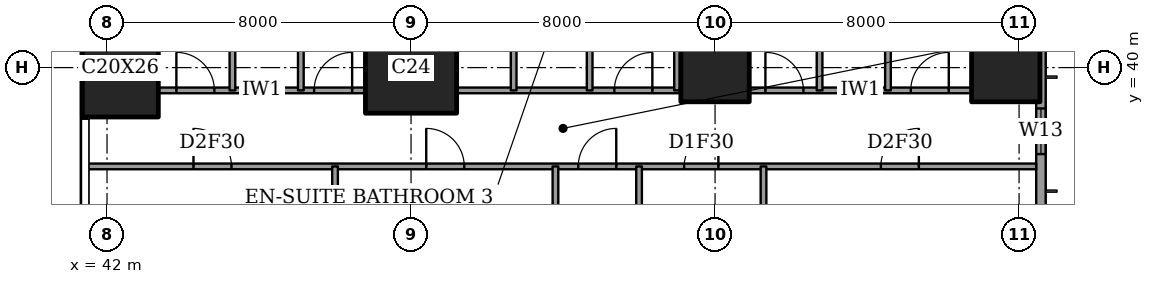
"""IFC4 building model, lengths in metres.
Left out: names, types, materials, properties, quantities, classifications, styles, units other than length and angle.
Written with IfcOpenShell. Run it as: python <this file> out.ifc"""

import sys

from ifc_helpers import new_model, si_unit, direction, frame, frame_2d, origin, origin_2d, place, context, subcontext, project, spatial, rectangle, extrude, element, fill, save


model = new_model("IFC4")
c1 = context("Model", 3, precision=1e-05, world=origin(), true_north=direction((0.0, 1.0)))
c2 = subcontext(c1, "Body", "Model", "MODEL_VIEW")
j1 = project(units=[si_unit("LENGTHUNIT", "METRE"), si_unit("PLANEANGLEUNIT", "RADIAN")], contexts=[c1])
p1 = place(None, origin())
s1 = spatial("IfcSite", under=j1, at=p1, CompositionType="ELEMENT")
p2 = place(p1, origin())
s2 = spatial("IfcBuilding", under=s1, at=p2, CompositionType="ELEMENT")
p3 = place(p2, frame((0.0, 0.0, 196.6)))
s3 = spatial("IfcBuildingStorey", under=s2, at=p3, CompositionType="ELEMENT", Elevation=196.6)
p4 = place(p3, frame((42.35, 40.0, 0.0), z_axis=(0.0, 0.0, 1.0), x_axis=(1.0, 0.0, 0.0)))
e1 = element("IfcColumn", 1, at=p4, inside=s3, PredefinedType="COLUMN", context=c2, shape_type="SweptSolid", body=[
    extrude(rectangle(XDim=2.0, YDim=2.6, at=origin_2d()), origin(), (0.0, 0.0, 1.0), 3.6),
])
p5 = place(p3, frame((50.0, 40.0, 0.0), z_axis=(0.0, 0.0, 1.0), x_axis=(1.0, 0.0, 0.0)))
e2 = element("IfcColumn", 2, at=p5, inside=s3, PredefinedType="COLUMN", context=c2, shape_type="SweptSolid", body=[
    extrude(rectangle(XDim=2.4, YDim=2.4, at=origin_2d()), origin(), (0.0, 0.0, 1.0), 3.6),
])
for number, where, z_axis, x_axis in (
    (3, (58.0, 40.0, 0.0), (0.0, 0.0, 1.0), (1.0, 0.0, 0.0)),
    (4, (65.65, 40.0, 0.0), (0.0, 0.0, 1.0), (1.0, 0.0, 0.0)),
):
    element("IfcColumn", number, at=place(p3, frame(where, z_axis=z_axis, x_axis=x_axis)), inside=s3, PredefinedType="COLUMN", context=c2, shape_type="SweptSolid", body=[
        extrude(rectangle(XDim=1.8, YDim=1.8, at=origin_2d()), origin(), (0.0, 0.0, 1.0), 3.6),
    ])
p6 = place(p3, frame((66.575, 3.175, 0.0), z_axis=(0.0, 0.0, 1.0), x_axis=(0.0, 1.0, 0.0)))
e5 = element("IfcWall", 5, at=p6, inside=s3, PredefinedType="SOLIDWALL", context=c2, shape_type="SweptSolid", body=[
    extrude(rectangle(XDim=41.65, YDim=0.25, at=frame_2d((20.825, 0.0))), origin(), (0.0, 0.0, 1.0), 3.6),
])
p7 = place(p6, frame((0.825, 0.0, 0.2)))
e6 = element("IfcOpeningElement", 6, at=p7, cuts=e5, PredefinedType="OPENING", context=c2, shape_type="SweptSolid", body=[
    extrude(rectangle(XDim=2.4, YDim=2.4, at=frame_2d((1.2, 1.2))), frame((0.0, 0.135, 0.0), z_axis=(0.0, -1.0, 0.0), x_axis=(1.0, 0.0, 0.0)), (0.0, 0.0, 1.0), 0.27),
])
p8 = place(p6, frame((6.05, 0.0, 0.2)))
e7 = element("IfcOpeningElement", 7, at=p8, cuts=e5, PredefinedType="OPENING", context=c2, shape_type="SweptSolid", body=[
    extrude(rectangle(XDim=1.2, YDim=2.4, at=frame_2d((0.6, 1.2))), frame((0.0, 0.135, 0.0), z_axis=(0.0, -1.0, 0.0), x_axis=(1.0, 0.0, 0.0)), (0.0, 0.0, 1.0), 0.27),
])
p9 = place(p6, frame((8.475, 0.0, 0.2)))
e8 = element("IfcOpeningElement", 8, at=p9, cuts=e5, PredefinedType="OPENING", context=c2, shape_type="SweptSolid", body=[
    extrude(rectangle(XDim=2.4, YDim=2.4, at=frame_2d((1.2, 1.2))), frame((0.0, 0.135, 0.0), z_axis=(0.0, -1.0, 0.0), x_axis=(1.0, 0.0, 0.0)), (0.0, 0.0, 1.0), 0.27),
])
p10 = place(p6, frame((15.675, 0.0, 0.2)))
e9 = element("IfcOpeningElement", 9, at=p10, cuts=e5, PredefinedType="OPENING", context=c2, shape_type="SweptSolid", body=[
    extrude(rectangle(XDim=2.4, YDim=2.4, at=frame_2d((1.2, 1.2))), frame((0.0, 0.135, 0.0), z_axis=(0.0, -1.0, 0.0), x_axis=(1.0, 0.0, 0.0)), (0.0, 0.0, 1.0), 0.27),
])
p11 = place(p6, frame((23.625, 0.0, 0.2)))
e10 = element("IfcOpeningElement", 10, at=p11, cuts=e5, PredefinedType="OPENING", context=c2, shape_type="SweptSolid", body=[
    extrude(rectangle(XDim=2.4, YDim=2.4, at=frame_2d((1.2, 1.2))), frame((0.0, 0.135, 0.0), z_axis=(0.0, -1.0, 0.0), x_axis=(1.0, 0.0, 0.0)), (0.0, 0.0, 1.0), 0.27),
])
p12 = place(p6, frame((30.775, 0.0, 0.2)))
e11 = element("IfcOpeningElement", 11, at=p12, cuts=e5, PredefinedType="OPENING", context=c2, shape_type="SweptSolid", body=[
    extrude(rectangle(XDim=2.4, YDim=2.4, at=frame_2d((1.2, 1.2))), frame((0.0, 0.135, 0.0), z_axis=(0.0, -1.0, 0.0), x_axis=(1.0, 0.0, 0.0)), (0.0, 0.0, 1.0), 0.27),
])
p13 = place(p6, frame((34.55, 0.0, 0.2)))
e12 = element("IfcOpeningElement", 12, at=p13, cuts=e5, PredefinedType="OPENING", context=c2, shape_type="SweptSolid", body=[
    extrude(rectangle(XDim=1.2, YDim=2.4, at=frame_2d((0.6, 1.2))), frame((0.0, 0.135, 0.0), z_axis=(0.0, -1.0, 0.0), x_axis=(1.0, 0.0, 0.0)), (0.0, 0.0, 1.0), 0.27),
])
p14 = place(p6, frame((38.425, 0.0, 0.2)))
e13 = element("IfcOpeningElement", 13, at=p14, cuts=e5, PredefinedType="OPENING", context=c2, shape_type="SweptSolid", body=[
    extrude(rectangle(XDim=2.4, YDim=2.4, at=frame_2d((1.2, 1.2))), frame((0.0, 0.135, 0.0), z_axis=(0.0, -1.0, 0.0), x_axis=(1.0, 0.0, 0.0)), (0.0, 0.0, 1.0), 0.27),
])
p15 = place(p3, frame((41.439, 37.4, 0.0), z_axis=(0.0, 0.0, 1.0), x_axis=(1.0, 0.0, 0.0)))
e14 = element("IfcWall", 14, at=p15, inside=s3, PredefinedType="PARTITIONING", context=c2, shape_type="SweptSolid", body=[
    extrude(rectangle(XDim=25.011, YDim=0.15, at=frame_2d((12.505, 0.0))), origin(), (0.0, 0.0, 1.0), 3.35),
])
p16 = place(p15, frame((12.961, 0.0, 0.0)))
e15 = element("IfcOpeningElement", 15, at=p16, cuts=e14, PredefinedType="OPENING", context=c2, shape_type="SweptSolid", body=[
    extrude(rectangle(XDim=1.0, YDim=2.1, at=frame_2d((0.5, 1.05))), frame((0.0, 0.085, 0.0), z_axis=(0.0, -1.0, 0.0), x_axis=(1.0, 0.0, 0.0)), (0.0, 0.0, 1.0), 0.17),
])
p17 = place(p15, frame((20.924, 0.0, 0.0)))
e16 = element("IfcOpeningElement", 16, at=p17, cuts=e14, PredefinedType="OPENING", context=c2, shape_type="SweptSolid", body=[
    extrude(rectangle(XDim=1.0, YDim=2.1, at=frame_2d((0.5, 1.05))), frame((0.0, 0.085, 0.0), z_axis=(0.0, -1.0, 0.0), x_axis=(1.0, 0.0, 0.0)), (0.0, 0.0, 1.0), 0.17),
])
p18 = place(p15, frame((15.749, 0.0, 0.0)))
e17 = element("IfcOpeningElement", 17, at=p18, cuts=e14, PredefinedType="OPENING", context=c2, shape_type="SweptSolid", body=[
    extrude(rectangle(XDim=0.9, YDim=2.1, at=frame_2d((0.45, 1.05))), frame((0.0, 0.085, 0.0), z_axis=(0.0, -1.0, 0.0), x_axis=(1.0, 0.0, 0.0)), (0.0, 0.0, 1.0), 0.17),
])
p19 = place(p15, frame((8.961, 0.0, 0.0)))
e18 = element("IfcOpeningElement", 18, at=p19, cuts=e14, PredefinedType="OPENING", context=c2, shape_type="SweptSolid", body=[
    extrude(rectangle(XDim=1.0, YDim=2.1, at=frame_2d((0.5, 1.05))), frame((0.0, 0.085, 0.0), z_axis=(0.0, -1.0, 0.0), x_axis=(1.0, 0.0, 0.0)), (0.0, 0.0, 1.0), 0.17),
])
p20 = place(p15, frame((2.836, 0.0, 0.0)))
e19 = element("IfcOpeningElement", 19, at=p20, cuts=e14, PredefinedType="OPENING", context=c2, shape_type="SweptSolid", body=[
    extrude(rectangle(XDim=1.0, YDim=2.1, at=frame_2d((0.5, 1.05))), frame((0.0, 0.085, 0.0), z_axis=(0.0, -1.0, 0.0), x_axis=(1.0, 0.0, 0.0)), (0.0, 0.0, 1.0), 0.17),
])
p21 = place(p3, frame((43.35, 39.4, 0.0), z_axis=(0.0, 0.0, 1.0), x_axis=(1.0, 0.0, 0.0)))
e20 = element("IfcWall", 20, at=p21, inside=s3, PredefinedType="PARTITIONING", context=c2, shape_type="SweptSolid", body=[
    extrude(rectangle(XDim=5.45, YDim=0.15, at=frame_2d((2.725, 0.0))), origin(), (0.0, 0.0, 1.0), 3.35),
])
p22 = place(p21, frame((4.1, 0.0, 0.0)))
e21 = element("IfcOpeningElement", 21, at=p22, cuts=e20, PredefinedType="OPENING", context=c2, shape_type="SweptSolid", body=[
    extrude(rectangle(XDim=1.0, YDim=2.1, at=frame_2d((0.5, 1.05))), frame((0.0, 0.085, 0.0), z_axis=(0.0, -1.0, 0.0), x_axis=(1.0, 0.0, 0.0)), (0.0, 0.0, 1.0), 0.17),
])
p23 = place(p21, frame((0.475, 0.0, 0.0)))
e22 = element("IfcOpeningElement", 22, at=p23, cuts=e20, PredefinedType="OPENING", context=c2, shape_type="SweptSolid", body=[
    extrude(rectangle(XDim=1.0, YDim=2.1, at=frame_2d((0.5, 1.05))), frame((0.0, 0.085, 0.0), z_axis=(0.0, -1.0, 0.0), x_axis=(1.0, 0.0, 0.0)), (0.0, 0.0, 1.0), 0.17),
])
p24 = place(p3, frame((51.2, 39.4, 0.0), z_axis=(0.0, 0.0, 1.0), x_axis=(1.0, 0.0, 0.0)))
e23 = element("IfcWall", 23, at=p24, inside=s3, PredefinedType="PARTITIONING", context=c2, shape_type="SweptSolid", body=[
    extrude(rectangle(XDim=5.9, YDim=0.15, at=frame_2d((2.95, 0.0))), origin(), (0.0, 0.0, 1.0), 3.35),
])
p25 = place(p24, frame((4.15, 0.0, 0.0)))
e24 = element("IfcOpeningElement", 24, at=p25, cuts=e23, PredefinedType="OPENING", context=c2, shape_type="SweptSolid", body=[
    extrude(rectangle(XDim=1.0, YDim=2.1, at=frame_2d((0.5, 1.05))), frame((0.0, 0.085, 0.0), z_axis=(0.0, -1.0, 0.0), x_axis=(1.0, 0.0, 0.0)), (0.0, 0.0, 1.0), 0.17),
])
p26 = place(p3, frame((58.9, 39.4, 0.0), z_axis=(0.0, 0.0, 1.0), x_axis=(1.0, 0.0, 0.0)))
e25 = element("IfcWall", 25, at=p26, inside=s3, PredefinedType="PARTITIONING", context=c2, shape_type="SweptSolid", body=[
    extrude(rectangle(XDim=5.85, YDim=0.15, at=frame_2d((2.925, 0.0))), origin(), (0.0, 0.0, 1.0), 3.35),
])
p27 = place(p26, frame((4.25, 0.0, 0.0)))
e26 = element("IfcOpeningElement", 26, at=p27, cuts=e25, PredefinedType="OPENING", context=c2, shape_type="SweptSolid", body=[
    extrude(rectangle(XDim=1.0, YDim=2.1, at=frame_2d((0.5, 1.05))), frame((0.0, 0.085, 0.0), z_axis=(0.0, -1.0, 0.0), x_axis=(1.0, 0.0, 0.0)), (0.0, 0.0, 1.0), 0.17),
])
p28 = place(p26, frame((0.425, 0.0, 0.0)))
e27 = element("IfcOpeningElement", 27, at=p28, cuts=e25, PredefinedType="OPENING", context=c2, shape_type="SweptSolid", body=[
    extrude(rectangle(XDim=1.0, YDim=2.1, at=frame_2d((0.5, 1.05))), frame((0.0, 0.085, 0.0), z_axis=(0.0, -1.0, 0.0), x_axis=(1.0, 0.0, 0.0)), (0.0, 0.0, 1.0), 0.17),
])
p29 = place(p3, frame((45.3, 39.4, 0.0), z_axis=(0.0, 0.0, 1.0), x_axis=(0.0, 1.0, 0.0)))
e28 = element("IfcWall", 28, at=p29, inside=s3, PredefinedType="PARTITIONING", context=c2, shape_type="SweptSolid", body=[
    extrude(rectangle(XDim=9.05, YDim=0.15, at=frame_2d((4.525, 0.0))), origin(), (0.0, 0.0, 1.0), 3.35),
])
p30 = place(p3, frame((47.1, 39.4, 0.0), z_axis=(0.0, 0.0, 1.0), x_axis=(0.0, 1.0, 0.0)))
e29 = element("IfcWall", 29, at=p30, inside=s3, PredefinedType="PARTITIONING", context=c2, shape_type="SweptSolid", body=[
    extrude(rectangle(XDim=3.5, YDim=0.15, at=frame_2d((1.75, 0.0))), origin(), (0.0, 0.0, 1.0), 3.35),
])
p31 = place(p30, frame((1.3, 0.0, 0.0)))
e30 = element("IfcOpeningElement", 30, at=p31, cuts=e29, PredefinedType="OPENING", context=c2, shape_type="SweptSolid", body=[
    extrude(rectangle(XDim=0.9, YDim=2.1, at=frame_2d((0.45, 1.05))), frame((0.0, 0.085, 0.0), z_axis=(0.0, -1.0, 0.0), x_axis=(1.0, 0.0, 0.0)), (0.0, 0.0, 1.0), 0.17),
])
p32 = place(p3, frame((48.0, 28.0, 0.0), z_axis=(0.0, 0.0, 1.0), x_axis=(0.0, 1.0, 0.0)))
e31 = element("IfcWall", 31, at=p32, inside=s3, PredefinedType="PARTITIONING", context=c2, shape_type="SweptSolid", body=[
    extrude(rectangle(XDim=9.4, YDim=0.15, at=frame_2d((4.7, 0.0))), origin(), (0.0, 0.0, 1.0), 3.35),
])
p33 = place(p32, frame((0.837, 0.0, 0.0)))
e32 = element("IfcOpeningElement", 32, at=p33, cuts=e31, PredefinedType="OPENING", context=c2, shape_type="SweptSolid", body=[
    extrude(rectangle(XDim=1.0, YDim=2.1, at=frame_2d((0.5, 1.05))), frame((0.0, 0.085, 0.0), z_axis=(0.0, -1.0, 0.0), x_axis=(1.0, 0.0, 0.0)), (0.0, 0.0, 1.0), 0.17),
])
p34 = place(p3, frame((52.7, 39.4, 0.0), z_axis=(0.0, 0.0, 1.0), x_axis=(0.0, 1.0, 0.0)))
e33 = element("IfcWall", 33, at=p34, inside=s3, PredefinedType="PARTITIONING", context=c2, shape_type="SweptSolid", body=[
    extrude(rectangle(XDim=9.05, YDim=0.15, at=frame_2d((4.525, 0.0))), origin(), (0.0, 0.0, 1.0), 3.35),
])
p35 = place(p34, frame((5.675, 0.0, 0.0)))
e34 = element("IfcOpeningElement", 34, at=p35, cuts=e33, PredefinedType="OPENING", context=c2, shape_type="SweptSolid", body=[
    extrude(rectangle(XDim=0.9, YDim=2.1, at=frame_2d((0.45, 1.05))), frame((0.0, 0.085, 0.0), z_axis=(0.0, -1.0, 0.0), x_axis=(1.0, 0.0, 0.0)), (0.0, 0.0, 1.0), 0.17),
])
p36 = place(p3, frame((53.8, 30.675, 0.0), z_axis=(0.0, 0.0, 1.0), x_axis=(0.0, 1.0, 0.0)))
e35 = element("IfcWall", 35, at=p36, inside=s3, PredefinedType="PARTITIONING", context=c2, shape_type="SweptSolid", body=[
    extrude(rectangle(XDim=6.725, YDim=0.15, at=frame_2d((3.362, 0.0))), origin(), (0.0, 0.0, 1.0), 3.35),
])
p37 = place(p3, frame((54.7, 39.4, 0.0), z_axis=(0.0, 0.0, 1.0), x_axis=(0.0, 1.0, 0.0)))
e36 = element("IfcWall", 36, at=p37, inside=s3, PredefinedType="PARTITIONING", context=c2, shape_type="SweptSolid", body=[
    extrude(rectangle(XDim=3.2, YDim=0.15, at=frame_2d((1.6, 0.0))), origin(), (0.0, 0.0, 1.0), 3.35),
])
p38 = place(p37, frame((1.15, 0.0, 0.0)))
e37 = element("IfcOpeningElement", 37, at=p38, cuts=e36, PredefinedType="OPENING", context=c2, shape_type="SweptSolid", body=[
    extrude(rectangle(XDim=0.9, YDim=2.1, at=frame_2d((0.45, 1.05))), frame((0.0, 0.085, 0.0), z_axis=(0.0, -1.0, 0.0), x_axis=(1.0, 0.0, 0.0)), (0.0, 0.0, 1.0), 0.17),
])
p39 = place(p3, frame((56.0, 28.0, 0.0), z_axis=(0.0, 0.0, 1.0), x_axis=(0.0, 1.0, 0.0)))
e38 = element("IfcWall", 38, at=p39, inside=s3, PredefinedType="PARTITIONING", context=c2, shape_type="SweptSolid", body=[
    extrude(rectangle(XDim=9.4, YDim=0.15, at=frame_2d((4.7, 0.0))), origin(), (0.0, 0.0, 1.0), 3.35),
])
p40 = place(p39, frame((0.837, 0.0, 0.0)))
e39 = element("IfcOpeningElement", 39, at=p40, cuts=e38, PredefinedType="OPENING", context=c2, shape_type="SweptSolid", body=[
    extrude(rectangle(XDim=1.0, YDim=2.1, at=frame_2d((0.5, 1.05))), frame((0.0, 0.085, 0.0), z_axis=(0.0, -1.0, 0.0), x_axis=(1.0, 0.0, 0.0)), (0.0, 0.0, 1.0), 0.17),
])
p41 = place(p3, frame((57.0, 39.4, 0.0), z_axis=(0.0, 0.0, 1.0), x_axis=(0.0, 1.0, 0.0)))
e40 = element("IfcWall", 40, at=p41, inside=s3, PredefinedType="PARTITIONING", context=c2, shape_type="SweptSolid", body=[
    extrude(rectangle(XDim=9.05, YDim=0.15, at=frame_2d((4.525, 0.0))), origin(), (0.0, 0.0, 1.0), 3.35),
])
p42 = place(p3, frame((59.275, 33.2, 0.0), z_axis=(0.0, 0.0, 1.0), x_axis=(0.0, 1.0, 0.0)))
e41 = element("IfcWall", 41, at=p42, inside=s3, PredefinedType="PARTITIONING", context=c2, shape_type="SweptSolid", body=[
    extrude(rectangle(XDim=4.2, YDim=0.15, at=frame_2d((2.1, 0.0))), origin(), (0.0, 0.0, 1.0), 3.35),
])
p43 = place(p3, frame((60.75, 39.4, 0.0), z_axis=(0.0, 0.0, 1.0), x_axis=(0.0, 1.0, 0.0)))
e42 = element("IfcWall", 42, at=p43, inside=s3, PredefinedType="PARTITIONING", context=c2, shape_type="SweptSolid", body=[
    extrude(rectangle(XDim=9.05, YDim=0.15, at=frame_2d((4.525, 0.0))), origin(), (0.0, 0.0, 1.0), 3.35),
])
p44 = place(p3, frame((62.55, 39.4, 0.0), z_axis=(0.0, 0.0, 1.0), x_axis=(0.0, 1.0, 0.0)))
e43 = element("IfcWall", 43, at=p44, inside=s3, PredefinedType="PARTITIONING", context=c2, shape_type="SweptSolid", body=[
    extrude(rectangle(XDim=3.5, YDim=0.15, at=frame_2d((1.75, 0.0))), origin(), (0.0, 0.0, 1.0), 3.35),
])
p45 = place(p44, frame((1.3, 0.0, 0.0)))
e44 = element("IfcOpeningElement", 44, at=p45, cuts=e43, PredefinedType="OPENING", context=c2, shape_type="SweptSolid", body=[
    extrude(rectangle(XDim=0.9, YDim=2.1, at=frame_2d((0.45, 1.05))), frame((0.0, 0.085, 0.0), z_axis=(0.0, -1.0, 0.0), x_axis=(1.0, 0.0, 0.0)), (0.0, 0.0, 1.0), 0.17),
])
p46 = place(p13, origin())
e45 = element("IfcWindow", 45, at=p46, inside=s3, PartitioningType="SINGLE_PANEL", PredefinedType="WINDOW", context=c2, shape_type="SweptSolid", body=[
    extrude(rectangle(XDim=1.2, YDim=2.4, at=frame_2d((0.6, 1.2))), frame((0.0, 0.03, 0.0), z_axis=(0.0, -1.0, 0.0), x_axis=(1.0, 0.0, 0.0)), (0.0, 0.0, 1.0), 0.06),
])
fill(e12, e45)
p47 = place(p27, origin())
e46 = element("IfcDoor", 46, at=p47, inside=s3, OperationType="SINGLE_SWING_LEFT", PredefinedType="DOOR", context=c2, shape_type="SweptSolid", body=[
    extrude(rectangle(XDim=1.0, YDim=2.1, at=frame_2d((0.5, 1.05))), frame((0.0, 0.025, 0.0), z_axis=(0.0, -1.0, 0.0), x_axis=(1.0, 0.0, 0.0)), (0.0, 0.0, 1.0), 0.05),
])
fill(e26, e46)
p48 = place(p28, origin())
e47 = element("IfcDoor", 47, at=p48, inside=s3, OperationType="SINGLE_SWING_RIGHT", PredefinedType="DOOR", context=c2, shape_type="SweptSolid", body=[
    extrude(rectangle(XDim=1.0, YDim=2.1, at=frame_2d((0.5, 1.05))), frame((0.0, 0.025, 0.0), z_axis=(0.0, -1.0, 0.0), x_axis=(1.0, 0.0, 0.0)), (0.0, 0.0, 1.0), 0.05),
])
fill(e27, e47)
p49 = place(p25, origin())
e48 = element("IfcDoor", 48, at=p49, inside=s3, OperationType="SINGLE_SWING_LEFT", PredefinedType="DOOR", context=c2, shape_type="SweptSolid", body=[
    extrude(rectangle(XDim=1.0, YDim=2.1, at=frame_2d((0.5, 1.05))), frame((0.0, 0.025, 0.0), z_axis=(0.0, -1.0, 0.0), x_axis=(1.0, 0.0, 0.0)), (0.0, 0.0, 1.0), 0.05),
])
fill(e24, e48)
p50 = place(p22, origin())
e49 = element("IfcDoor", 49, at=p50, inside=s3, OperationType="SINGLE_SWING_LEFT", PredefinedType="DOOR", context=c2, shape_type="SweptSolid", body=[
    extrude(rectangle(XDim=1.0, YDim=2.1, at=frame_2d((0.5, 1.05))), frame((0.0, 0.025, 0.0), z_axis=(0.0, -1.0, 0.0), x_axis=(1.0, 0.0, 0.0)), (0.0, 0.0, 1.0), 0.05),
])
fill(e21, e49)
p51 = place(p23, origin())
e50 = element("IfcDoor", 50, at=p51, inside=s3, OperationType="SINGLE_SWING_RIGHT", PredefinedType="DOOR", context=c2, shape_type="SweptSolid", body=[
    extrude(rectangle(XDim=1.0, YDim=2.1, at=frame_2d((0.5, 1.05))), frame((0.0, 0.025, 0.0), z_axis=(0.0, -1.0, 0.0), x_axis=(1.0, 0.0, 0.0)), (0.0, 0.0, 1.0), 0.05),
])
fill(e22, e50)
p52 = place(p16, origin())
e51 = element("IfcDoor", 51, at=p52, inside=s3, OperationType="SINGLE_SWING_LEFT", PredefinedType="DOOR", context=c2, shape_type="SweptSolid", body=[
    extrude(rectangle(XDim=1.0, YDim=2.1, at=frame_2d((0.5, 1.05))), frame((0.0, 0.025, 0.0), z_axis=(0.0, -1.0, 0.0), x_axis=(1.0, 0.0, 0.0)), (0.0, 0.0, 1.0), 0.05),
])
fill(e15, e51)
p53 = place(p17, origin())
e52 = element("IfcDoor", 52, at=p53, inside=s3, OperationType="SINGLE_SWING_LEFT", PredefinedType="DOOR", context=c2, shape_type="SweptSolid", body=[
    extrude(rectangle(XDim=1.0, YDim=2.1, at=frame_2d((0.5, 1.05))), frame((0.0, 0.025, 0.0), z_axis=(0.0, -1.0, 0.0), x_axis=(1.0, 0.0, 0.0)), (0.0, 0.0, 1.0), 0.05),
])
fill(e16, e52)
p54 = place(p18, origin())
e53 = element("IfcDoor", 53, at=p54, inside=s3, OperationType="SINGLE_SWING_LEFT", PredefinedType="DOOR", context=c2, shape_type="SweptSolid", body=[
    extrude(rectangle(XDim=0.9, YDim=2.1, at=frame_2d((0.45, 1.05))), frame((0.0, 0.025, 0.0), z_axis=(0.0, -1.0, 0.0), x_axis=(1.0, 0.0, 0.0)), (0.0, 0.0, 1.0), 0.05),
])
fill(e17, e53)
p55 = place(p19, origin())
e54 = element("IfcDoor", 54, at=p55, inside=s3, OperationType="SINGLE_SWING_RIGHT", PredefinedType="DOOR", context=c2, shape_type="SweptSolid", body=[
    extrude(rectangle(XDim=1.0, YDim=2.1, at=frame_2d((0.5, 1.05))), frame((0.0, 0.025, 0.0), z_axis=(0.0, -1.0, 0.0), x_axis=(1.0, 0.0, 0.0)), (0.0, 0.0, 1.0), 0.05),
])
fill(e18, e54)
p56 = place(p20, origin())
e55 = element("IfcDoor", 55, at=p56, inside=s3, OperationType="SINGLE_SWING_RIGHT", PredefinedType="DOOR", context=c2, shape_type="SweptSolid", body=[
    extrude(rectangle(XDim=1.0, YDim=2.1, at=frame_2d((0.5, 1.05))), frame((0.0, 0.025, 0.0), z_axis=(0.0, -1.0, 0.0), x_axis=(1.0, 0.0, 0.0)), (0.0, 0.0, 1.0), 0.05),
])
fill(e19, e55)
save(model, sys.argv[1])
